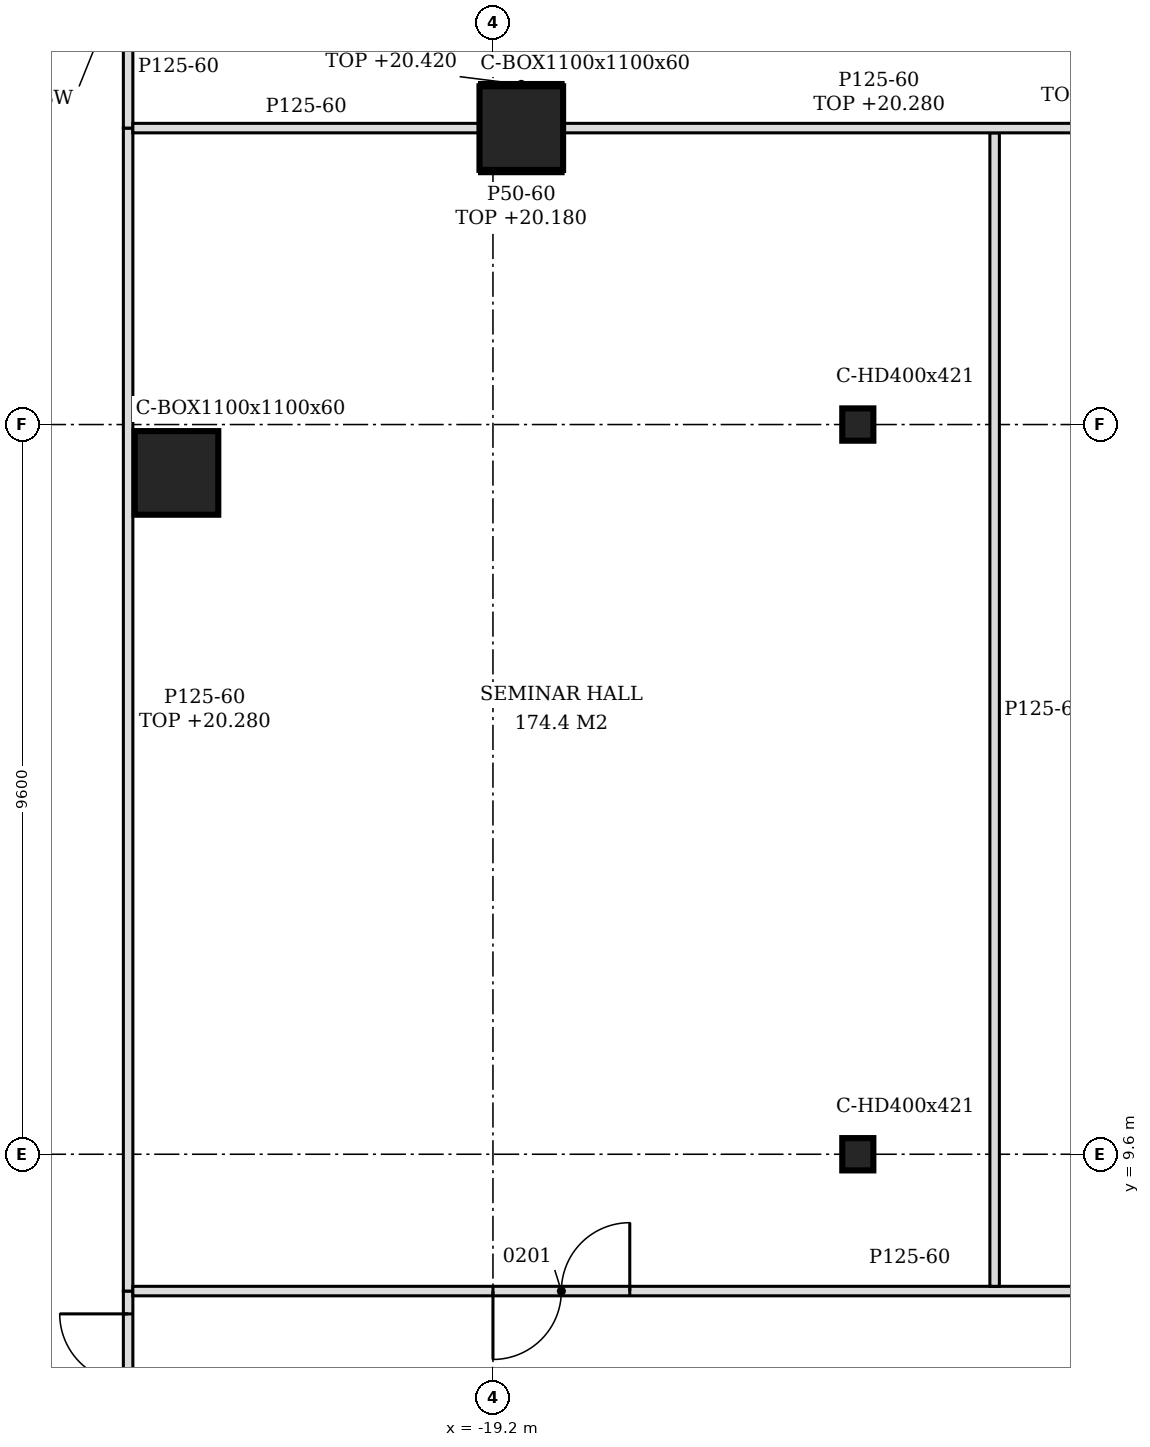
"""IFC4 building model, lengths in metres.
Left out: names, types, materials, properties, quantities, classifications, styles, units other than length and angle.
Written with IfcOpenShell. Run it as: python <this file> out.ifc"""

import sys

from ifc_helpers import new_model, si_unit, direction, frame, frame_2d, origin, origin_2d, place, context, subcontext, project, spatial, polyline, rectangle, hollow_rectangle, i_section, outline, extrude, element, fill, save


model = new_model("IFC4")
c1 = context("Model", 3, precision=1e-05, world=origin(), true_north=direction((0.0, 1.0)))
c2 = subcontext(c1, "Body", "Model", "MODEL_VIEW")
j1 = project(units=[si_unit("LENGTHUNIT", "METRE"), si_unit("PLANEANGLEUNIT", "RADIAN")], contexts=[c1])
p1 = place(None, origin())
s1 = spatial("IfcSite", under=j1, at=p1, CompositionType="ELEMENT")
p2 = place(p1, origin())
s2 = spatial("IfcBuilding", under=s1, at=p2, CompositionType="ELEMENT")
p3 = place(p2, frame((0.0, 0.0, 15.0)))
s3 = spatial("IfcBuildingStorey", under=s2, at=p3, CompositionType="ELEMENT", Elevation=15.0)
for number, where, z_axis, x_axis in (
    (1, (-18.827, 23.1, -0.2), (0.0, 0.0, 1.0), (1.0, 0.0, 0.0)),
    (2, (-23.364, 18.564, -0.2), (0.0, 0.0, 1.0), (1.0, 0.0, 0.0)),
):
    element("IfcColumn", number, at=place(p3, frame(where, z_axis=z_axis, x_axis=x_axis)), inside=s3, PredefinedType="COLUMN", context=c2, shape_type="SweptSolid", body=[
        extrude(hollow_rectangle(XDim=1.1, YDim=1.1, WallThickness=0.06, at=origin_2d()), origin(), (0.0, 0.0, 1.0), 6.0),
    ])
for number, where, z_axis, x_axis in (
    (3, (-14.4, 9.6, -0.2), (0.0, 0.0, 1.0), (1.0, 0.0, 0.0)),
    (4, (-14.4, 19.2, -0.2), (0.0, 0.0, 1.0), (1.0, 0.0, 0.0)),
):
    element("IfcColumn", number, at=place(p3, frame(where, z_axis=z_axis, x_axis=x_axis)), inside=s3, PredefinedType="COLUMN", context=c2, shape_type="SweptSolid", body=[
        extrude(i_section(OverallWidth=0.409, OverallDepth=0.425, WebThickness=0.033, FlangeThickness=0.052, FilletRadius=0.015, at=origin_2d()), origin(), (0.0, 0.0, 1.0), 6.0),
    ])
p4 = place(p3, frame((-24.0, 5.4, 0.0), z_axis=(0.0, 0.0, 1.0), x_axis=(0.0, 1.0, 0.0)))
e5 = element("IfcWall", 5, at=p4, inside=s3, PredefinedType="PARTITIONING", context=c2, shape_type="SweptSolid", body=[
    extrude(rectangle(XDim=2.4, YDim=0.125, at=frame_2d((1.2, 0.0))), origin(), (0.0, 0.0, 1.0), 5.28),
])
p5 = place(p4, frame((0.3, 0.0, 0.0)))
e6 = element("IfcOpeningElement", 6, at=p5, cuts=e5, PredefinedType="OPENING", context=c2, shape_type="SweptSolid", body=[
    extrude(rectangle(XDim=1.8, YDim=2.1, at=frame_2d((0.9, 1.05))), frame((0.0, 0.073, 0.0), z_axis=(0.0, -1.0, 0.0), x_axis=(1.0, 0.0, 0.0)), (0.0, 0.0, 1.0), 0.145),
])
p6 = place(p3, frame((-24.0, 7.8, 0.0), z_axis=(0.0, 0.0, 1.0), x_axis=(0.0, 1.0, 0.0)))
e7 = element("IfcWall", 7, at=p6, inside=s3, PredefinedType="PARTITIONING", context=c2, shape_type="SweptSolid", body=[
    extrude(outline(polyline([(0.0, 0.0), (15.3, 0.0), (15.3, 5.28), (11.55, 5.28), (11.548, 5.18), (11.25, 5.18), (11.248, 5.28), (1.95, 5.28), (1.948, 5.08), (1.65, 5.08), (1.648, 5.28), (0.0, 5.28), (0.0, 0.0)])), frame((0.0, 0.062, 0.0), z_axis=(0.0, -1.0, 0.0), x_axis=(1.0, 0.0, 0.0)), (0.0, 0.0, 1.0), 0.125),
])
p7 = place(p3, frame((-23.938, 7.8, 0.0), z_axis=(0.0, 0.0, 1.0), x_axis=(1.0, 0.0, 0.0)))
e8 = element("IfcWall", 8, at=p7, inside=s3, PredefinedType="PARTITIONING", context=c2, shape_type="SweptSolid", body=[
    extrude(outline(polyline([(0.0, 0.0), (19.2, 0.0), (19.2, 5.18), (18.988, 5.18), (18.986, 5.8), (14.438, 5.8), (14.436, 5.28), (14.238, 5.28), (14.236, 5.8), (9.637, 5.8), (9.635, 5.28), (9.438, 5.28), (9.436, 5.8), (4.837, 5.8), (4.835, 5.28), (4.637, 5.28), (4.635, 5.8), (0.038, 5.8), (0.035, 5.28), (0.0, 5.28), (0.0, 0.0)])), frame((0.0, 0.062, 0.0), z_axis=(0.0, -1.0, 0.0), x_axis=(1.0, 0.0, 0.0)), (0.0, 0.0, 1.0), 0.125),
])
p8 = place(p7, frame((4.738, 0.0, 0.0)))
e9 = element("IfcOpeningElement", 9, at=p8, cuts=e8, PredefinedType="OPENING", context=c2, shape_type="SweptSolid", body=[
    extrude(rectangle(XDim=1.8, YDim=2.1, at=frame_2d((0.9, 1.05))), frame((0.0, 0.073, 0.0), z_axis=(0.0, -1.0, 0.0), x_axis=(1.0, 0.0, 0.0)), (0.0, 0.0, 1.0), 0.145),
])
p9 = place(p7, frame((14.788, 0.0, 0.0)))
e10 = element("IfcOpeningElement", 10, at=p9, cuts=e8, PredefinedType="OPENING", context=c2, shape_type="SweptSolid", body=[
    extrude(rectangle(XDim=0.9, YDim=2.1, at=frame_2d((0.45, 1.05))), frame((0.0, 0.073, 0.0), z_axis=(0.0, -1.0, 0.0), x_axis=(1.0, 0.0, 0.0)), (0.0, 0.0, 1.0), 0.145),
])
p10 = place(p3, frame((-12.6, 7.863, 0.0), z_axis=(0.0, 0.0, 1.0), x_axis=(0.0, 1.0, 0.0)))
e11 = element("IfcWall", 11, at=p10, inside=s3, PredefinedType="PARTITIONING", context=c2, shape_type="SweptSolid", body=[
    extrude(outline(polyline([(0.0, 0.0), (15.175, 0.0), (15.175, 5.28), (15.087, 5.28), (15.085, 5.8), (1.887, 5.8), (1.885, 5.28), (1.587, 5.28), (1.585, 5.8), (0.0, 5.8), (0.0, 0.0)])), frame((0.0, 0.062, 0.0), z_axis=(0.0, -1.0, 0.0), x_axis=(1.0, 0.0, 0.0)), (0.0, 0.0, 1.0), 0.125),
])
p11 = place(p3, frame((-24.0, 23.1, 0.0), z_axis=(0.0, 0.0, 1.0), x_axis=(0.0, 1.0, 0.0)))
e12 = element("IfcWall", 12, at=p11, inside=s3, PredefinedType="PARTITIONING", context=c2, shape_type="SweptSolid", body=[
    extrude(rectangle(XDim=1.6, YDim=0.125, at=frame_2d((0.8, 0.0))), origin(), (0.0, 0.0, 1.0), 5.8),
])
p12 = place(p3, frame((-23.938, 23.1, 0.0), z_axis=(0.0, 0.0, 1.0), x_axis=(1.0, 0.0, 0.0)))
e13 = element("IfcWall", 13, at=p12, inside=s3, PredefinedType="PARTITIONING", context=c2, shape_type="SweptSolid", body=[
    extrude(rectangle(XDim=4.56, YDim=0.125, at=frame_2d((2.28, 0.0))), origin(), (0.0, 0.0, 1.0), 5.8),
])
p13 = place(p3, frame((-18.277, 23.1, 0.0), z_axis=(0.0, 0.0, 1.0), x_axis=(1.0, 0.0, 0.0)))
e14 = element("IfcWall", 14, at=p13, inside=s3, PredefinedType="PARTITIONING", context=c2, shape_type="SweptSolid", body=[
    extrude(rectangle(XDim=8.313, YDim=0.125, at=frame_2d((4.157, 0.0))), origin(), (0.0, 0.0, 1.0), 5.28),
])
p14 = place(p3, frame((-19.377, 22.525, 0.0), z_axis=(0.0, 0.0, 1.0), x_axis=(1.0, 0.0, 0.0)))
e15 = element("IfcWall", 15, at=p14, inside=s3, PredefinedType="PARTITIONING", context=c2, shape_type="SweptSolid", body=[
    extrude(rectangle(XDim=1.1, YDim=0.05, at=frame_2d((0.55, 0.0))), origin(), (0.0, 0.0, 1.0), 5.18),
])
p15 = place(p3, frame((-19.377, 23.675, 0.0), z_axis=(0.0, 0.0, 1.0), x_axis=(1.0, 0.0, 0.0)))
e16 = element("IfcWall", 16, at=p15, inside=s3, PredefinedType="PARTITIONING", context=c2, shape_type="SweptSolid", body=[
    extrude(rectangle(XDim=1.1, YDim=0.05, at=frame_2d((0.55, 0.0))), origin(), (0.0, 0.0, 1.0), 5.42),
])
p16 = place(p5, frame((1.8, 0.0, 0.0), z_axis=(0.0, 0.0, 1.0), x_axis=(-1.0, 0.0, 0.0)))
e17 = element("IfcDoor", 17, at=p16, inside=s3, OperationType="DOUBLE_DOOR_SINGLE_SWING", PredefinedType="DOOR", context=c2, shape_type="SweptSolid", body=[
    extrude(rectangle(XDim=1.8, YDim=2.1, at=frame_2d((0.9, 1.05))), frame((0.0, 0.025, 0.0), z_axis=(0.0, -1.0, 0.0), x_axis=(1.0, 0.0, 0.0)), (0.0, 0.0, 1.0), 0.05),
])
fill(e6, e17)
p17 = place(p8, frame((1.8, 0.0, 0.0), z_axis=(0.0, 0.0, 1.0), x_axis=(-1.0, 0.0, 0.0)))
e18 = element("IfcDoor", 18, at=p17, inside=s3, OperationType="DOUBLE_DOOR_SINGLE_SWING", PredefinedType="DOOR", context=c2, shape_type="SweptSolid", body=[
    extrude(rectangle(XDim=1.8, YDim=2.1, at=frame_2d((0.9, 1.05))), frame((0.0, 0.025, 0.0), z_axis=(0.0, -1.0, 0.0), x_axis=(1.0, 0.0, 0.0)), (0.0, 0.0, 1.0), 0.05),
])
fill(e9, e18)
save(model, sys.argv[1])
